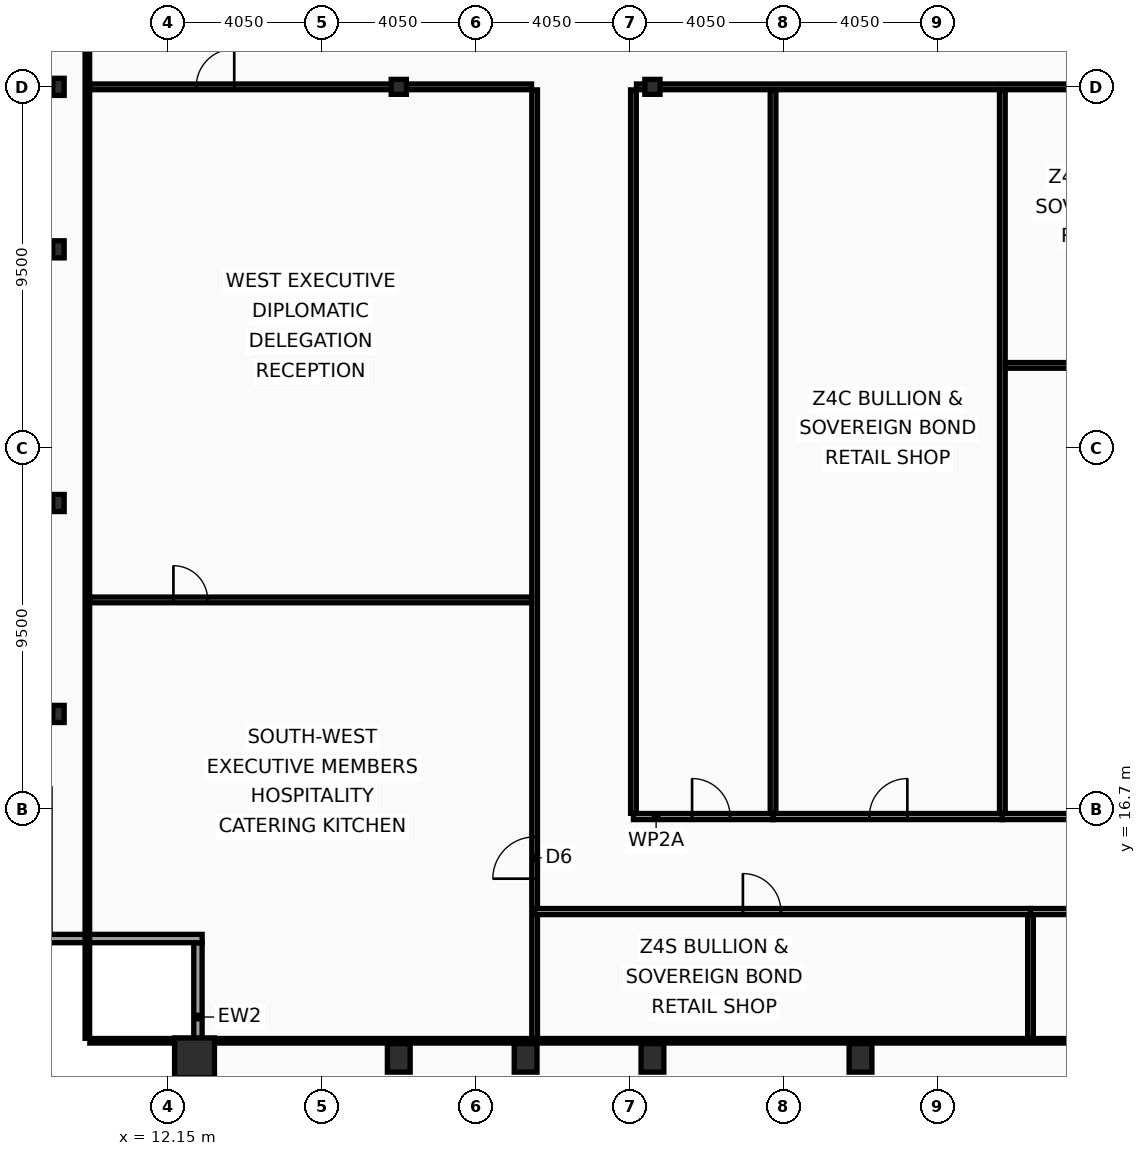
"""IFC4 building model, lengths in metres.
Left out: names, types, materials, properties, quantities, classifications, styles, units other than length and angle.
Written with IfcOpenShell. Run it as: python <this file> out.ifc"""

import sys

from ifc_helpers import new_model, si_unit, direction, frame, frame_2d, origin, origin_2d, place, context, subcontext, project, spatial, rectangle, hollow_rectangle, i_section, extrude, element, fill, save


model = new_model("IFC4")
c1 = context("Model", 3, precision=1e-05, world=origin(), true_north=direction((0.0, 1.0)))
c2 = subcontext(c1, "Body", "Model", "MODEL_VIEW")
j1 = project(units=[si_unit("LENGTHUNIT", "METRE"), si_unit("PLANEANGLEUNIT", "RADIAN")], contexts=[c1])
p1 = place(None, origin())
s1 = spatial("IfcSite", under=j1, at=p1, CompositionType="ELEMENT")
p2 = place(p1, origin())
s2 = spatial("IfcBuilding", under=s1, at=p2, CompositionType="ELEMENT")
p3 = place(p2, frame((0.0, 0.0, 269.8)))
s3 = spatial("IfcBuildingStorey", under=s2, at=p3, CompositionType="ELEMENT", Elevation=269.8)
p4 = place(p3, frame((12.85, 10.15, 0.0), z_axis=(0.0, 0.0, 1.0), x_axis=(1.0, 0.0, 0.0)))
e1 = element("IfcColumn", 1, at=p4, inside=s3, PredefinedType="COLUMN", context=c2, shape_type="SweptSolid", body=[
    extrude(hollow_rectangle(XDim=1.05, YDim=1.05, WallThickness=0.055, at=origin_2d()), origin(), (0.0, 0.0, 1.0), 3.6),
])
for number, where, z_axis, x_axis in (
    (2, (18.225, 10.15, 0.0), (0.0, 0.0, 1.0), (1.0, 0.0, 0.0)),
    (3, (21.562, 10.15, 0.0), (0.0, 0.0, 1.0), (1.0, 0.0, 0.0)),
    (4, (24.9, 10.15, 0.0), (0.0, 0.0, 1.0), (1.0, 0.0, 0.0)),
    (5, (30.375, 10.15, 0.0), (0.0, 0.0, 1.0), (1.0, 0.0, 0.0)),
):
    element("IfcColumn", number, at=place(p3, frame(where, z_axis=z_axis, x_axis=x_axis)), inside=s3, PredefinedType="COLUMN", context=c2, shape_type="SweptSolid", body=[
        extrude(hollow_rectangle(XDim=0.6, YDim=0.75, WallThickness=0.045, at=origin_2d()), origin(), (0.0, 0.0, 1.0), 3.6),
    ])
for number, where, z_axis, x_axis in (
    (6, (9.27, 19.2, 0.0), (0.0, 0.0, 1.0), (1.0, 0.0, 0.0)),
    (7, (9.27, 24.75, 0.0), (0.0, 0.0, 1.0), (1.0, 0.0, 0.0)),
    (8, (9.27, 31.425, 0.0), (0.0, 0.0, 1.0), (1.0, 0.0, 0.0)),
    (9, (9.27, 35.7, 0.0), (0.0, 0.0, 1.0), (1.0, 0.0, 0.0)),
):
    element("IfcColumn", number, at=place(p3, frame(where, z_axis=z_axis, x_axis=x_axis)), inside=s3, PredefinedType="COLUMN", context=c2, shape_type="SweptSolid", body=[
        extrude(i_section(OverallWidth=0.3, OverallDepth=0.45, WebThickness=0.014, FlangeThickness=0.026, at=origin_2d()), origin(), (0.0, 0.0, 1.0), 3.6),
    ])
for number, where, z_axis, x_axis in (
    (10, (18.225, 35.7, 0.0), (0.0, 0.0, 1.0), (1.0, 0.0, 0.0)),
    (11, (24.9, 35.7, 0.0), (0.0, 0.0, 1.0), (1.0, 0.0, 0.0)),
):
    element("IfcColumn", number, at=place(p3, frame(where, z_axis=z_axis, x_axis=x_axis)), inside=s3, PredefinedType="COLUMN", context=c2, shape_type="SweptSolid", body=[
        extrude(i_section(OverallWidth=0.399, OverallDepth=0.393, WebThickness=0.023, FlangeThickness=0.037, at=origin_2d()), origin(), (0.0, 0.0, 1.0), 3.6),
    ])
p5 = place(p3, frame((12.94, 9.27, 0.0), z_axis=(0.0, 0.0, 1.0), x_axis=(0.0, 1.0, 0.0)))
e12 = element("IfcWall", 12, at=p5, inside=s3, PredefinedType="SOLIDWALL", context=c2, shape_type="SweptSolid", body=[
    extrude(rectangle(XDim=3.91, YDim=0.22, at=frame_2d((1.955, 0.0))), origin(), (0.0, 0.0, 1.0), 2.88),
])
p6 = place(p3, frame((13.05, 13.29, 0.0), z_axis=(0.0, 0.0, 1.0), x_axis=(-1.0, 0.0, 0.0)))
e13 = element("IfcWall", 13, at=p6, inside=s3, PredefinedType="SOLIDWALL", context=c2, shape_type="SweptSolid", body=[
    extrude(rectangle(XDim=4.22, YDim=0.22, at=frame_2d((2.11, 0.0))), origin(), (0.0, 0.0, 1.0), 2.88),
])
p7 = place(p3, frame((21.8, 10.665, 0.0), z_axis=(0.0, 0.0, 1.0), x_axis=(0.0, 1.0, 0.0)))
e14 = element("IfcWall", 14, at=p7, inside=s3, PredefinedType="PARTITIONING", context=c2, shape_type="SweptSolid", body=[
    extrude(rectangle(XDim=24.955, YDim=0.15, at=frame_2d((12.478, 0.0))), origin(), (0.0, 0.0, 1.0), 3.03),
])
p8 = place(p7, frame((4.2, 0.0, 0.0)))
e15 = element("IfcOpeningElement", 15, at=p8, cuts=e14, PredefinedType="OPENING", context=c2, shape_type="SweptSolid", body=[
    extrude(rectangle(XDim=1.1, YDim=2.1, at=frame_2d((0.55, 1.05))), frame((0.0, 0.085, 0.0), z_axis=(0.0, -1.0, 0.0), x_axis=(1.0, 0.0, 0.0)), (0.0, 0.0, 1.0), 0.17),
])
p9 = place(p3, frame((10.095, 35.7, 0.0), z_axis=(0.0, 0.0, 1.0), x_axis=(1.0, 0.0, 0.0)))
e16 = element("IfcWall", 16, at=p9, inside=s3, PredefinedType="PARTITIONING", context=c2, shape_type="SweptSolid", body=[
    extrude(rectangle(XDim=11.625, YDim=0.15, at=frame_2d((5.812, 0.0))), origin(), (0.0, 0.0, 1.0), 2.78),
])
p10 = place(p9, frame((2.8, 0.0, 0.0)))
e17 = element("IfcOpeningElement", 17, at=p10, cuts=e16, PredefinedType="OPENING", context=c2, shape_type="SweptSolid", body=[
    extrude(rectangle(XDim=1.0, YDim=2.05, at=frame_2d((0.5, 1.025))), frame((0.0, 0.085, 0.0), z_axis=(0.0, -1.0, 0.0), x_axis=(1.0, 0.0, 0.0)), (0.0, 0.0, 1.0), 0.17),
])
p11 = place(p3, frame((10.095, 22.2, 0.0), z_axis=(0.0, 0.0, 1.0), x_axis=(1.0, 0.0, 0.0)))
e18 = element("IfcWall", 18, at=p11, inside=s3, PredefinedType="PARTITIONING", context=c2, shape_type="SweptSolid", body=[
    extrude(rectangle(XDim=11.625, YDim=0.15, at=frame_2d((5.812, 0.0))), origin(), (0.0, 0.0, 1.0), 2.78),
])
p12 = place(p11, frame((2.2, 0.0, 0.0)))
e19 = element("IfcOpeningElement", 19, at=p12, cuts=e18, PredefinedType="OPENING", context=c2, shape_type="SweptSolid", body=[
    extrude(rectangle(XDim=0.9, YDim=2.05, at=frame_2d((0.45, 1.025))), frame((0.0, 0.085, 0.0), z_axis=(0.0, -1.0, 0.0), x_axis=(1.0, 0.0, 0.0)), (0.0, 0.0, 1.0), 0.17),
])
p13 = place(p3, frame((24.4, 16.585, 0.0), z_axis=(0.0, 0.0, 1.0), x_axis=(0.0, 1.0, 0.0)))
e20 = element("IfcWall", 20, at=p13, inside=s3, PredefinedType="PARTITIONING", context=c2, shape_type="SweptSolid", body=[
    extrude(rectangle(XDim=19.035, YDim=0.15, at=frame_2d((9.518, 0.0))), origin(), (0.0, 0.0, 1.0), 2.78),
])
p14 = place(p3, frame((24.48, 35.7, 0.0), z_axis=(0.0, 0.0, 1.0), x_axis=(1.0, 0.0, 0.0)))
e21 = element("IfcWall", 21, at=p14, inside=s3, PredefinedType="PARTITIONING", context=c2, shape_type="SweptSolid", body=[
    extrude(rectangle(XDim=25.02, YDim=0.15, at=frame_2d((12.51, 0.0))), origin(), (0.0, 0.0, 1.0), 2.78),
])
p15 = place(p3, frame((24.4, 16.5, 0.0), z_axis=(0.0, 0.0, 1.0), x_axis=(1.0, 0.0, 0.0)))
e22 = element("IfcWall", 22, at=p15, inside=s3, PredefinedType="PARTITIONING", context=c2, shape_type="SweptSolid", body=[
    extrude(rectangle(XDim=3.674, YDim=0.16, at=frame_2d((1.837, 0.0))), origin(), (0.0, 0.0, 1.0), 2.78),
])
p16 = place(p15, frame((1.543, 0.0, 0.0)))
e23 = element("IfcOpeningElement", 23, at=p16, cuts=e22, PredefinedType="OPENING", context=c2, shape_type="SweptSolid", body=[
    extrude(rectangle(XDim=1.0, YDim=2.05, at=frame_2d((0.5, 1.025))), frame((0.0, 0.09, 0.0), z_axis=(0.0, -1.0, 0.0), x_axis=(1.0, 0.0, 0.0)), (0.0, 0.0, 1.0), 0.18),
])
p17 = place(p3, frame((28.074, 16.5, 0.0), z_axis=(0.0, 0.0, 1.0), x_axis=(1.0, 0.0, 0.0)))
e24 = element("IfcWall", 24, at=p17, inside=s3, PredefinedType="PARTITIONING", context=c2, shape_type="SweptSolid", body=[
    extrude(rectangle(XDim=6.033, YDim=0.16, at=frame_2d((3.017, 0.0))), origin(), (0.0, 0.0, 1.0), 2.78),
])
p18 = place(p17, frame((2.534, 0.0, 0.0)))
e25 = element("IfcOpeningElement", 25, at=p18, cuts=e24, PredefinedType="OPENING", context=c2, shape_type="SweptSolid", body=[
    extrude(rectangle(XDim=1.0, YDim=2.05, at=frame_2d((0.5, 1.025))), frame((0.0, 0.09, 0.0), z_axis=(0.0, -1.0, 0.0), x_axis=(1.0, 0.0, 0.0)), (0.0, 0.0, 1.0), 0.18),
])
p19 = place(p3, frame((28.074, 16.585, 0.0), z_axis=(0.0, 0.0, 1.0), x_axis=(0.0, 1.0, 0.0)))
e26 = element("IfcWall", 26, at=p19, inside=s3, PredefinedType="PARTITIONING", context=c2, shape_type="SweptSolid", body=[
    extrude(rectangle(XDim=19.035, YDim=0.15, at=frame_2d((9.518, 0.0))), origin(), (0.0, 0.0, 1.0), 3.03),
])
p20 = place(p3, frame((34.107, 16.5, 0.0), z_axis=(0.0, 0.0, 1.0), x_axis=(1.0, 0.0, 0.0)))
e27 = element("IfcWall", 27, at=p20, inside=s3, PredefinedType="PARTITIONING", context=c2, shape_type="SweptSolid", body=[
    extrude(rectangle(XDim=8.929, YDim=0.16, at=frame_2d((4.465, 0.0))), origin(), (0.0, 0.0, 1.0), 2.78),
])
p21 = place(p20, frame((3.75, 0.0, 0.0)))
e28 = element("IfcOpeningElement", 28, at=p21, cuts=e27, PredefinedType="OPENING", context=c2, shape_type="SweptSolid", body=[
    extrude(rectangle(XDim=1.0, YDim=2.05, at=frame_2d((0.5, 1.025))), frame((0.0, 0.09, 0.0), z_axis=(0.0, -1.0, 0.0), x_axis=(1.0, 0.0, 0.0)), (0.0, 0.0, 1.0), 0.18),
])
p22 = place(p3, frame((34.107, 16.585, 0.0), z_axis=(0.0, 0.0, 1.0), x_axis=(0.0, 1.0, 0.0)))
e29 = element("IfcWall", 29, at=p22, inside=s3, PredefinedType="PARTITIONING", context=c2, shape_type="SweptSolid", body=[
    extrude(rectangle(XDim=19.035, YDim=0.15, at=frame_2d((9.518, 0.0))), origin(), (0.0, 0.0, 1.0), 3.03),
])
p23 = place(p3, frame((34.187, 28.371, 0.0), z_axis=(0.0, 0.0, 1.0), x_axis=(1.0, 0.0, 0.0)))
e30 = element("IfcWall", 30, at=p23, inside=s3, PredefinedType="PARTITIONING", context=c2, shape_type="SweptSolid", body=[
    extrude(rectangle(XDim=8.769, YDim=0.15, at=frame_2d((4.385, 0.0))), origin(), (0.0, 0.0, 1.0), 2.78),
])
p24 = place(p23, frame((4.018, 0.0, 0.0)))
e31 = element("IfcOpeningElement", 31, at=p24, cuts=e30, PredefinedType="OPENING", context=c2, shape_type="SweptSolid", body=[
    extrude(rectangle(XDim=0.9, YDim=2.05, at=frame_2d((0.45, 1.025))), frame((0.0, 0.085, 0.0), z_axis=(0.0, -1.0, 0.0), x_axis=(1.0, 0.0, 0.0)), (0.0, 0.0, 1.0), 0.17),
])
p25 = place(p3, frame((21.8, 14.0, 0.0), z_axis=(0.0, 0.0, 1.0), x_axis=(1.0, 0.0, 0.0)))
e32 = element("IfcWall", 32, at=p25, inside=s3, PredefinedType="PARTITIONING", context=c2, shape_type="SweptSolid", body=[
    extrude(rectangle(XDim=13.048, YDim=0.16, at=frame_2d((6.524, 0.0))), origin(), (0.0, 0.0, 1.0), 2.78),
])
p26 = place(p25, frame((5.48, 0.0, 0.0)))
e33 = element("IfcOpeningElement", 33, at=p26, cuts=e32, PredefinedType="OPENING", context=c2, shape_type="SweptSolid", body=[
    extrude(rectangle(XDim=1.0, YDim=2.05, at=frame_2d((0.5, 1.025))), frame((0.0, 0.09, 0.0), z_axis=(0.0, -1.0, 0.0), x_axis=(1.0, 0.0, 0.0)), (0.0, 0.0, 1.0), 0.18),
])
p27 = place(p3, frame((34.848, 14.0, 0.0), z_axis=(0.0, 0.0, 1.0), x_axis=(1.0, 0.0, 0.0)))
e34 = element("IfcWall", 34, at=p27, inside=s3, PredefinedType="PARTITIONING", context=c2, shape_type="SweptSolid", body=[
    extrude(rectangle(XDim=7.576, YDim=0.16, at=frame_2d((3.788, 0.0))), origin(), (0.0, 0.0, 1.0), 2.78),
])
p28 = place(p27, frame((3.182, 0.0, 0.0)))
e35 = element("IfcOpeningElement", 35, at=p28, cuts=e34, PredefinedType="OPENING", context=c2, shape_type="SweptSolid", body=[
    extrude(rectangle(XDim=1.0, YDim=2.05, at=frame_2d((0.5, 1.025))), frame((0.0, 0.09, 0.0), z_axis=(0.0, -1.0, 0.0), x_axis=(1.0, 0.0, 0.0)), (0.0, 0.0, 1.0), 0.18),
])
p29 = place(p3, frame((34.848, 10.665, 0.0), z_axis=(0.0, 0.0, 1.0), x_axis=(0.0, 1.0, 0.0)))
e36 = element("IfcWall", 36, at=p29, inside=s3, PredefinedType="PARTITIONING", context=c2, shape_type="SweptSolid", body=[
    extrude(rectangle(XDim=3.25, YDim=0.15, at=frame_2d((1.625, 0.0))), origin(), (0.0, 0.0, 1.0), 3.44),
])
p30 = place(p3, frame((10.03, 10.665, 0.0), z_axis=(0.0, 0.0, 1.0), x_axis=(0.0, 1.0, 0.0)))
e37 = element("IfcWall", 37, at=p30, inside=s3, PredefinedType="PARTITIONING", context=c2, shape_type="SweptSolid", body=[
    extrude(rectangle(XDim=42.11, YDim=0.12, at=frame_2d((21.055, 0.0))), origin(), (0.0, 0.0, 1.0), 2.78),
])
p31 = place(p3, frame((10.095, 10.6, 0.0), z_axis=(0.0, 0.0, 1.0), x_axis=(1.0, 0.0, 0.0)))
e38 = element("IfcWall", 38, at=p31, inside=s3, PredefinedType="PARTITIONING", context=c2, shape_type="SweptSolid", body=[
    extrude(rectangle(XDim=52.71, YDim=0.12, at=frame_2d((26.355, 0.0))), origin(), (0.0, 0.0, 1.0), 2.78),
])
p32 = place(p8, origin())
e39 = element("IfcDoor", 39, at=p32, inside=s3, OperationType="SINGLE_SWING_LEFT", PredefinedType="DOOR", context=c2, shape_type="SweptSolid", body=[
    extrude(rectangle(XDim=1.1, YDim=2.1, at=frame_2d((0.55, 1.05))), frame((0.0, 0.025, 0.0), z_axis=(0.0, -1.0, 0.0), x_axis=(1.0, 0.0, 0.0)), (0.0, 0.0, 1.0), 0.05),
])
fill(e15, e39)
p33 = place(p10, origin())
e40 = element("IfcDoor", 40, at=p33, inside=s3, OperationType="SINGLE_SWING_RIGHT", PredefinedType="DOOR", context=c2, shape_type="SweptSolid", body=[
    extrude(rectangle(XDim=1.0, YDim=2.05, at=frame_2d((0.5, 1.025))), frame((0.0, 0.025, 0.0), z_axis=(0.0, -1.0, 0.0), x_axis=(1.0, 0.0, 0.0)), (0.0, 0.0, 1.0), 0.05),
])
fill(e17, e40)
p34 = place(p12, origin())
e41 = element("IfcDoor", 41, at=p34, inside=s3, OperationType="SINGLE_SWING_LEFT", PredefinedType="DOOR", context=c2, shape_type="SweptSolid", body=[
    extrude(rectangle(XDim=0.9, YDim=2.05, at=frame_2d((0.45, 1.025))), frame((0.0, 0.025, 0.0), z_axis=(0.0, -1.0, 0.0), x_axis=(1.0, 0.0, 0.0)), (0.0, 0.0, 1.0), 0.05),
])
fill(e19, e41)
p35 = place(p16, origin())
e42 = element("IfcDoor", 42, at=p35, inside=s3, OperationType="SINGLE_SWING_LEFT", PredefinedType="DOOR", context=c2, shape_type="SweptSolid", body=[
    extrude(rectangle(XDim=1.0, YDim=2.05, at=frame_2d((0.5, 1.025))), frame((0.0, 0.025, 0.0), z_axis=(0.0, -1.0, 0.0), x_axis=(1.0, 0.0, 0.0)), (0.0, 0.0, 1.0), 0.05),
])
fill(e23, e42)
p36 = place(p18, origin())
e43 = element("IfcDoor", 43, at=p36, inside=s3, OperationType="SINGLE_SWING_RIGHT", PredefinedType="DOOR", context=c2, shape_type="SweptSolid", body=[
    extrude(rectangle(XDim=1.0, YDim=2.05, at=frame_2d((0.5, 1.025))), frame((0.0, 0.025, 0.0), z_axis=(0.0, -1.0, 0.0), x_axis=(1.0, 0.0, 0.0)), (0.0, 0.0, 1.0), 0.05),
])
fill(e25, e43)
p37 = place(p26, origin())
e44 = element("IfcDoor", 44, at=p37, inside=s3, OperationType="SINGLE_SWING_LEFT", PredefinedType="DOOR", context=c2, shape_type="SweptSolid", body=[
    extrude(rectangle(XDim=1.0, YDim=2.05, at=frame_2d((0.5, 1.025))), frame((0.0, 0.025, 0.0), z_axis=(0.0, -1.0, 0.0), x_axis=(1.0, 0.0, 0.0)), (0.0, 0.0, 1.0), 0.05),
])
fill(e33, e44)
save(model, sys.argv[1])
